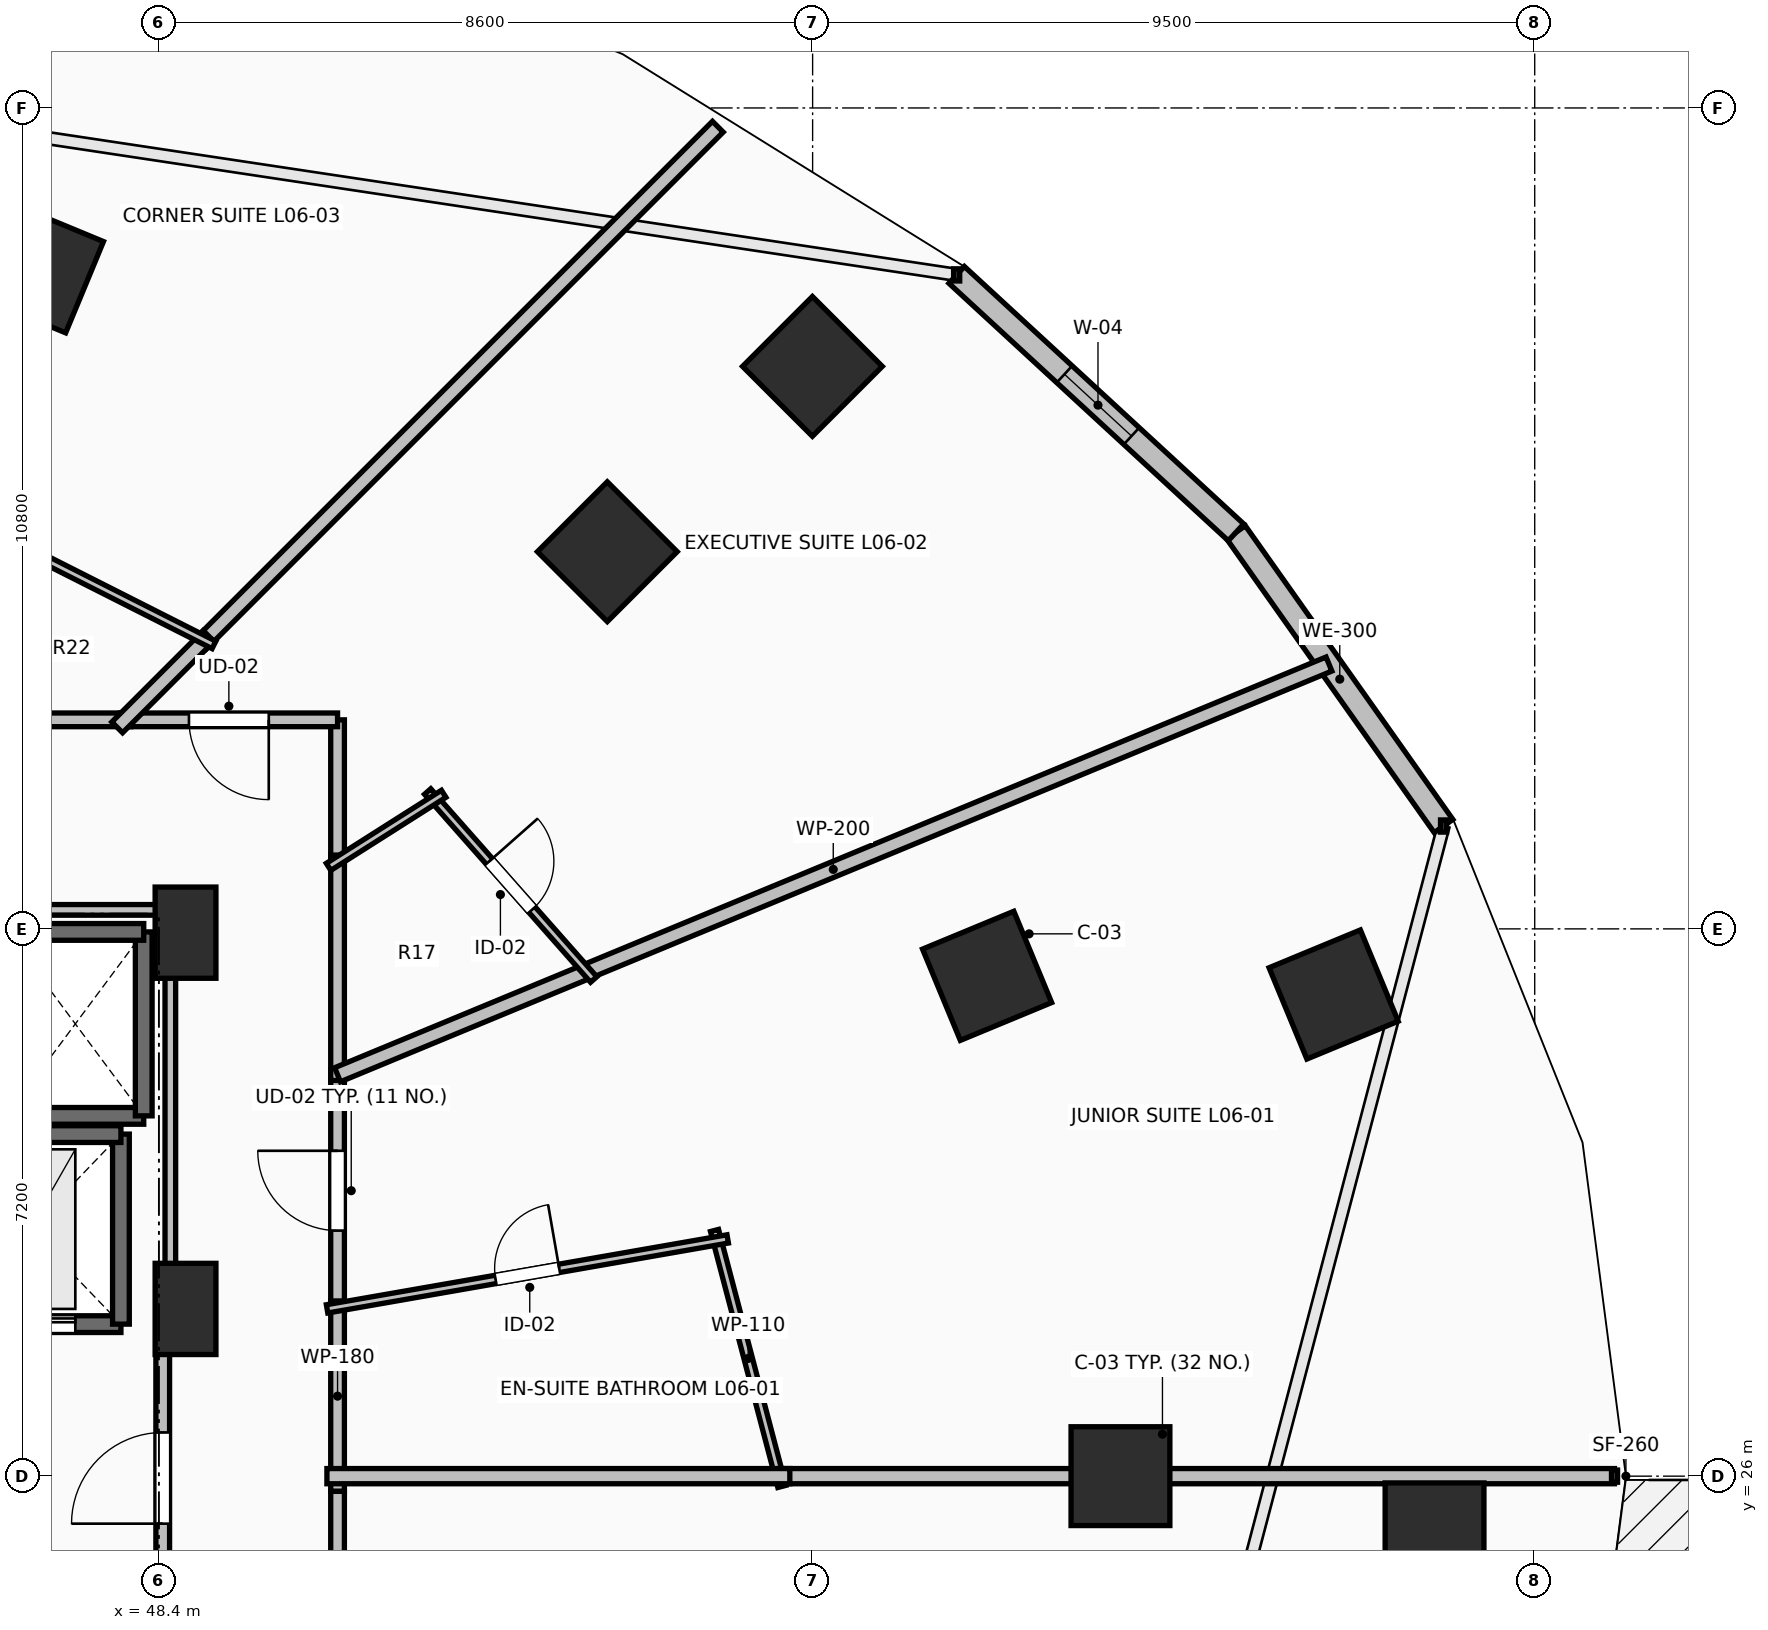
"""IFC4 building model, lengths in metres.
Left out: names, types, materials, properties, quantities, classifications, styles, units other than length and angle.
Written with IfcOpenShell. Run it as: python <this file> out.ifc"""

import sys

from ifc_helpers import new_model, si_unit, direction, frame, frame_2d, origin, origin_2d, place, context, subcontext, project, spatial, rectangle, extrude, element, fill, save


model = new_model("IFC4")
c1 = context("Model", 3, precision=1e-05, world=origin(), true_north=direction((0.0, 1.0)))
c2 = subcontext(c1, "Body", "Model", "MODEL_VIEW")
j1 = project(units=[si_unit("LENGTHUNIT", "METRE"), si_unit("PLANEANGLEUNIT", "RADIAN")], contexts=[c1])
p1 = place(None, origin())
s1 = spatial("IfcSite", under=j1, at=p1, CompositionType="ELEMENT")
p2 = place(p1, origin())
s2 = spatial("IfcBuilding", under=s1, at=p2, CompositionType="ELEMENT")
p3 = place(p2, frame((0.0, 0.0, 27.5)))
s3 = spatial("IfcBuildingStorey", under=s2, at=p3, CompositionType="ELEMENT", Elevation=27.5)
for number, where, z_axis, x_axis in (
    (1, (61.05, 26.0, 0.0), (0.0, 0.0, 1.0), (1.0, 0.0, 0.0)),
    (2, (59.295, 32.582, 0.0), (0.0, 0.0, 1.0), (0.924, 0.383, 0.0)),
    (3, (54.299, 38.162, 0.0), (0.0, 0.0, 1.0), (0.707, 0.707, 0.0)),
    (4, (46.821, 41.891, 0.0), (0.0, 0.0, 1.0), (0.383, 0.924, 0.0)),
    (5, (65.182, 25.261, 0.0), (0.0, 0.0, 1.0), (1.0, 0.0, 0.0)),
    (6, (63.854, 32.337, 0.0), (0.0, 0.0, 1.0), (0.924, 0.383, 0.0)),
    (7, (56.997, 40.6, 0.0), (0.0, 0.0, 1.0), (0.707, 0.707, 0.0)),
):
    element("IfcColumn", number, at=place(p3, frame(where, z_axis=z_axis, x_axis=x_axis)), inside=s3, PredefinedType="COLUMN", context=c2, shape_type="SweptSolid", body=[
        extrude(rectangle(XDim=1.3, YDim=1.3, at=origin_2d()), origin(), (0.0, 0.0, 1.0), 3.5),
    ])
for number, where, z_axis, x_axis in (
    (8, (48.75, 33.15, 0.0), (0.0, 0.0, 1.0), (1.0, 0.0, 0.0)),
    (9, (48.75, 28.2, 0.0), (0.0, 0.0, 1.0), (1.0, 0.0, 0.0)),
):
    element("IfcColumn", number, at=place(p3, frame(where, z_axis=z_axis, x_axis=x_axis)), inside=s3, PredefinedType="PILASTER", context=c2, shape_type="SweptSolid", body=[
        extrude(rectangle(XDim=0.8, YDim=1.2, at=origin_2d()), origin(), (0.0, 0.0, 1.0), 3.5),
    ])
p4 = place(p3, frame((65.301, 34.553, 0.0), z_axis=(0.0, 0.0, 1.0), x_axis=(-0.577130815624, 0.816651713803, 0.0)))
e10 = element("IfcWall", 10, at=p4, inside=s3, PredefinedType="STANDARD", context=c2, shape_type="SweptSolid", body=[
    extrude(rectangle(XDim=4.731, YDim=0.3, at=frame_2d((2.366, 0.0))), origin(), (0.0, 0.0, 1.0), 3.24),
])
p5 = place(p3, frame((62.57, 38.417, 0.0), z_axis=(0.0, 0.0, 1.0), x_axis=(-0.735342629635, 0.677695519419, 0.0)))
e11 = element("IfcWall", 11, at=p5, inside=s3, PredefinedType="STANDARD", context=c2, shape_type="SweptSolid", body=[
    extrude(rectangle(XDim=4.997, YDim=0.3, at=frame_2d((2.499, 0.0))), origin(), (0.0, 0.0, 1.0), 3.24),
])
p6 = place(p5, frame((1.869, 0.0, 0.85)))
e12 = element("IfcOpeningElement", 12, at=p6, cuts=e11, PredefinedType="OPENING", context=c2, shape_type="SweptSolid", body=[
    extrude(rectangle(XDim=1.2, YDim=1.95, at=frame_2d((0.6, 0.975))), frame((0.0, 0.165, 0.0), z_axis=(0.0, -1.0, 0.0), x_axis=(1.0, 0.0, 0.0)), (0.0, 0.0, 1.0), 0.33),
])
p7 = place(p3, frame((46.4, 30.74, 0.0), z_axis=(0.0, 0.0, 1.0), x_axis=(1.0, 0.0, 0.0)))
e13 = element("IfcWall", 13, at=p7, inside=s3, PredefinedType="SOLIDWALL", context=c2, shape_type="SweptSolid", body=[
    extrude(rectangle(XDim=1.8, YDim=0.22, at=frame_2d((0.9, 0.0))), origin(), (0.0, 0.0, 1.0), 3.24),
])
p8 = place(p3, frame((48.2, 30.74, 0.0), z_axis=(0.0, 0.0, 1.0), x_axis=(0.0, 1.0, 0.0)))
e14 = element("IfcWall", 14, at=p8, inside=s3, PredefinedType="SOLIDWALL", context=c2, shape_type="SweptSolid", body=[
    extrude(rectangle(XDim=2.42, YDim=0.22, at=frame_2d((1.21, 0.0))), origin(), (0.0, 0.0, 1.0), 3.24),
])
p9 = place(p3, frame((48.2, 33.16, 0.0), z_axis=(0.0, 0.0, 1.0), x_axis=(-1.0, 0.0, 0.0)))
e15 = element("IfcWall", 15, at=p9, inside=s3, PredefinedType="SOLIDWALL", context=c2, shape_type="SweptSolid", body=[
    extrude(rectangle(XDim=1.8, YDim=0.22, at=frame_2d((0.9, 0.0))), origin(), (0.0, 0.0, 1.0), 3.24),
])
p10 = place(p3, frame((45.5, 28.0, 0.0), z_axis=(0.0, 0.0, 1.0), x_axis=(1.0, 0.0, 0.0)))
e16 = element("IfcWall", 16, at=p10, inside=s3, PredefinedType="SHEAR", context=c2, shape_type="SweptSolid", body=[
    extrude(rectangle(XDim=2.4, YDim=0.22, at=frame_2d((1.2, 0.0))), origin(), (0.0, 0.0, 1.0), 3.24),
])
p11 = place(p10, frame((0.6, 0.0, 0.0)))
e17 = element("IfcOpeningElement", 17, at=p11, cuts=e16, PredefinedType="OPENING", context=c2, shape_type="SweptSolid", body=[
    extrude(rectangle(XDim=1.2, YDim=2.2, at=frame_2d((0.6, 1.1))), frame((0.0, 0.125, 0.0), z_axis=(0.0, -1.0, 0.0), x_axis=(1.0, 0.0, 0.0)), (0.0, 0.0, 1.0), 0.25),
])
p12 = place(p3, frame((47.9, 28.0, 0.0), z_axis=(0.0, 0.0, 1.0), x_axis=(0.0, 1.0, 0.0)))
e18 = element("IfcWall", 18, at=p12, inside=s3, PredefinedType="SHEAR", context=c2, shape_type="SweptSolid", body=[
    extrude(rectangle(XDim=2.5, YDim=0.22, at=frame_2d((1.25, 0.0))), origin(), (0.0, 0.0, 1.0), 3.24),
])
p13 = place(p3, frame((47.9, 30.5, 0.0), z_axis=(0.0, 0.0, 1.0), x_axis=(-1.0, 0.0, 0.0)))
e19 = element("IfcWall", 19, at=p13, inside=s3, PredefinedType="SHEAR", context=c2, shape_type="SweptSolid", body=[
    extrude(rectangle(XDim=2.4, YDim=0.22, at=frame_2d((1.2, 0.0))), origin(), (0.0, 0.0, 1.0), 3.24),
])
p14 = place(p3, frame((48.45, 23.95, 0.0), z_axis=(0.0, 0.0, 1.0), x_axis=(0.0, 1.0, 0.0)))
e20 = element("IfcWall", 20, at=p14, inside=s3, PredefinedType="PARTITIONING", context=c2, shape_type="SweptSolid", body=[
    extrude(rectangle(XDim=4.05, YDim=0.18, at=frame_2d((2.025, 0.0))), origin(), (0.0, 0.0, 1.0), 3.24),
])
p15 = place(p14, frame((1.425, 0.0, 0.0)))
e21 = element("IfcOpeningElement", 21, at=p15, cuts=e20, PredefinedType="OPENING", context=c2, shape_type="SweptSolid", body=[
    extrude(rectangle(XDim=1.2, YDim=2.15, at=frame_2d((0.6, 1.075))), frame((0.0, 0.105, 0.0), z_axis=(0.0, -1.0, 0.0), x_axis=(1.0, 0.0, 0.0)), (0.0, 0.0, 1.0), 0.21),
])
p16 = place(p3, frame((50.75, 28.165, 0.0), z_axis=(0.0, 0.0, 1.0), x_axis=(0.0, 1.0, 0.0)))
e22 = element("IfcWall", 22, at=p16, inside=s3, PredefinedType="PARTITIONING", context=c2, shape_type="SweptSolid", body=[
    extrude(rectangle(XDim=3.181, YDim=0.18, at=frame_2d((1.59, 0.0))), origin(), (0.0, 0.0, 1.0), 3.24),
])
p17 = place(p16, frame((1.065, 0.0, 0.0)))
e23 = element("IfcOpeningElement", 23, at=p17, cuts=e22, PredefinedType="OPENING", context=c2, shape_type="SweptSolid", body=[
    extrude(rectangle(XDim=1.05, YDim=2.2, at=frame_2d((0.525, 1.1))), frame((0.0, 0.105, 0.0), z_axis=(0.0, -1.0, 0.0), x_axis=(1.0, 0.0, 0.0)), (0.0, 0.0, 1.0), 0.21),
])
p18 = place(p3, frame((50.75, 25.8, 0.0), z_axis=(0.0, 0.0, 1.0), x_axis=(0.0, 1.0, 0.0)))
e24 = element("IfcWall", 24, at=p18, inside=s3, PredefinedType="PARTITIONING", context=c2, shape_type="SweptSolid", body=[
    extrude(rectangle(XDim=2.505, YDim=0.18, at=frame_2d((1.252, 0.0))), origin(), (0.0, 0.0, 1.0), 2.432),
])
p19 = place(p3, frame((50.75, 34.031, 0.0), z_axis=(0.0, 0.0, 1.0), x_axis=(0.0, 1.0, 0.0)))
e25 = element("IfcWall", 25, at=p19, inside=s3, PredefinedType="PARTITIONING", context=c2, shape_type="SweptSolid", body=[
    extrude(rectangle(XDim=1.919, YDim=0.18, at=frame_2d((0.959, 0.0))), origin(), (0.0, 0.0, 1.0), 2.432),
])
p20 = place(p3, frame((50.75, 35.95, 0.0), z_axis=(0.0, 0.0, 1.0), x_axis=(-1.0, 0.0, 0.0)))
e26 = element("IfcWall", 26, at=p20, inside=s3, PredefinedType="PARTITIONING", context=c2, shape_type="SweptSolid", body=[
    extrude(rectangle(XDim=2.86, YDim=0.18, at=frame_2d((1.43, 0.0))), origin(), (0.0, 0.0, 1.0), 2.432),
])
p21 = place(p20, frame((0.905, 0.0, 0.0)))
e27 = element("IfcOpeningElement", 27, at=p21, cuts=e26, PredefinedType="OPENING", context=c2, shape_type="SweptSolid", body=[
    extrude(rectangle(XDim=1.05, YDim=2.2, at=frame_2d((0.525, 1.1))), frame((0.0, 0.105, 0.0), z_axis=(0.0, -1.0, 0.0), x_axis=(1.0, 0.0, 0.0)), (0.0, 0.0, 1.0), 0.21),
])
p22 = place(p3, frame((50.75, 31.206, 0.0), z_axis=(0.0, 0.0, 1.0), x_axis=(0.0, 1.0, 0.0)))
e28 = element("IfcWall", 28, at=p22, inside=s3, PredefinedType="PARTITIONING", context=c2, shape_type="SweptSolid", body=[
    extrude(rectangle(XDim=2.965, YDim=0.18, at=frame_2d((1.482, 0.0))), origin(), (0.0, 0.0, 1.0), 2.432),
])
p23 = place(p3, frame((48.03, 35.95, 0.0), z_axis=(0.0, 0.0, 1.0), x_axis=(-1.0, 0.0, 0.0)))
e29 = element("IfcWall", 29, at=p23, inside=s3, PredefinedType="PARTITIONING", context=c2, shape_type="SweptSolid", body=[
    extrude(rectangle(XDim=3.104, YDim=0.18, at=frame_2d((1.552, 0.0))), origin(), (0.0, 0.0, 1.0), 2.432),
])
p24 = place(p3, frame((50.75, 14.1, 0.0), z_axis=(0.0, 0.0, 1.0), x_axis=(0.0, 1.0, 0.0)))
e30 = element("IfcWall", 30, at=p24, inside=s3, PredefinedType="PARTITIONING", context=c2, shape_type="SweptSolid", body=[
    extrude(rectangle(XDim=11.7, YDim=0.18, at=frame_2d((5.85, 0.0))), origin(), (0.0, 0.0, 1.0), 2.432),
])
p25 = place(p24, frame((5.35, 0.0, 0.0)))
e31 = element("IfcOpeningElement", 31, at=p25, cuts=e30, PredefinedType="OPENING", context=c2, shape_type="SweptSolid", body=[
    extrude(rectangle(XDim=1.0, YDim=2.15, at=frame_2d((0.5, 1.075))), frame((0.0, 0.105, 0.0), z_axis=(0.0, -1.0, 0.0), x_axis=(1.0, 0.0, 0.0)), (0.0, 0.0, 1.0), 0.21),
])
p26 = place(p3, frame((55.709, 29.232, 0.0), z_axis=(0.0, 0.0, 1.0), x_axis=(0.254476045764, -0.967079077497, 0.0)))
e32 = element("IfcWall", 32, at=p26, inside=s3, PredefinedType="PARTITIONING", context=c2, shape_type="SweptSolid", body=[
    extrude(rectangle(XDim=3.483, YDim=0.11, at=frame_2d((1.741, 0.0))), origin(), (0.0, 0.0, 1.0), 2.432),
])
p27 = place(p3, frame((50.612, 28.201, 0.0), z_axis=(0.0, 0.0, 1.0), x_axis=(0.985100697644, 0.171978532096, 0.0)))
e33 = element("IfcWall", 33, at=p27, inside=s3, PredefinedType="PARTITIONING", context=c2, shape_type="SweptSolid", body=[
    extrude(rectangle(XDim=5.351, YDim=0.11, at=frame_2d((2.675, 0.0))), origin(), (0.0, 0.0, 1.0), 2.922),
])
p28 = place(p27, frame((2.25, 0.0, 0.0)))
e34 = element("IfcOpeningElement", 34, at=p28, cuts=e33, PredefinedType="OPENING", context=c2, shape_type="SweptSolid", body=[
    extrude(rectangle(XDim=0.85, YDim=2.1, at=frame_2d((0.425, 1.05))), frame((0.0, 0.07, 0.0), z_axis=(0.0, -1.0, 0.0), x_axis=(1.0, 0.0, 0.0)), (0.0, 0.0, 1.0), 0.14),
])
p29 = place(p3, frame((63.793, 36.684, 0.0), z_axis=(0.0, 0.0, 1.0), x_axis=(-0.923866969846, -0.382713759914, 0.0)))
e35 = element("IfcWall", 35, at=p29, inside=s3, PredefinedType="PARTITIONING", context=c2, shape_type="SweptSolid", body=[
    extrude(rectangle(XDim=14.118, YDim=0.2, at=frame_2d((7.059, 0.0))), origin(), (0.0, 0.0, 1.0), 2.432),
])
p30 = place(p3, frame((56.56, 26.0, 0.0), z_axis=(0.0, 0.0, 1.0), x_axis=(1.0, 0.0, 0.0)))
e36 = element("IfcWall", 36, at=p30, inside=s3, PredefinedType="PARTITIONING", context=c2, shape_type="SweptSolid", body=[
    extrude(rectangle(XDim=10.989, YDim=0.2, at=frame_2d((5.495, 0.0))), origin(), (0.0, 0.0, 1.0), 2.432),
])
p31 = place(p3, frame((50.61, 26.0, 0.0), z_axis=(0.0, 0.0, 1.0), x_axis=(1.0, 0.0, 0.0)))
e37 = element("IfcWall", 37, at=p31, inside=s3, PredefinedType="PARTITIONING", context=c2, shape_type="SweptSolid", body=[
    extrude(rectangle(XDim=6.09, YDim=0.2, at=frame_2d((3.045, 0.0))), origin(), (0.0, 0.0, 1.0), 2.432),
])
p32 = place(p3, frame((51.935, 35.007, 0.0), z_axis=(0.0, 0.0, 1.0), x_axis=(0.662059609276, -0.749451181709, 0.0)))
e38 = element("IfcWall", 38, at=p32, inside=s3, PredefinedType="PARTITIONING", context=c2, shape_type="SweptSolid", body=[
    extrude(rectangle(XDim=3.299, YDim=0.11, at=frame_2d((1.65, 0.0))), origin(), (0.0, 0.0, 1.0), 2.432),
])
p33 = place(p32, frame((1.225, 0.0, 0.0)))
e39 = element("IfcOpeningElement", 39, at=p33, cuts=e38, PredefinedType="OPENING", context=c2, shape_type="SweptSolid", body=[
    extrude(rectangle(XDim=0.85, YDim=2.1, at=frame_2d((0.425, 1.05))), frame((0.0, 0.07, 0.0), z_axis=(0.0, -1.0, 0.0), x_axis=(1.0, 0.0, 0.0)), (0.0, 0.0, 1.0), 0.14),
])
p34 = place(p3, frame((50.632, 34.016, 0.0), z_axis=(0.0, 0.0, 1.0), x_axis=(0.844361394482, 0.535774052665, 0.0)))
e40 = element("IfcWall", 40, at=p34, inside=s3, PredefinedType="PARTITIONING", context=c2, shape_type="SweptSolid", body=[
    extrude(rectangle(XDim=1.793, YDim=0.11, at=frame_2d((0.897, 0.0))), origin(), (0.0, 0.0, 1.0), 2.922),
])
p35 = place(p3, frame((55.753, 43.753, 0.0), z_axis=(0.0, 0.0, 1.0), x_axis=(-0.707106781187, -0.707106781187, 0.0)))
e41 = element("IfcWall", 41, at=p35, inside=s3, PredefinedType="PARTITIONING", context=c2, shape_type="SweptSolid", body=[
    extrude(rectangle(XDim=9.615, YDim=0.2, at=frame_2d((4.808, 0.0))), origin(), (0.0, 0.0, 1.0), 2.624),
])
p36 = place(p3, frame((49.053, 37.053, 0.0), z_axis=(0.0, 0.0, 1.0), x_axis=(-0.707106781187, -0.707106781187, 0.0)))
e42 = element("IfcWall", 42, at=p36, inside=s3, PredefinedType="PARTITIONING", context=c2, shape_type="SweptSolid", body=[
    extrude(rectangle(XDim=1.7, YDim=0.2, at=frame_2d((0.85, 0.0))), origin(), (0.0, 0.0, 1.0), 2.432),
])
p37 = place(p3, frame((46.462, 38.281, 0.0), z_axis=(0.0, 0.0, 1.0), x_axis=(0.892486842203, -0.451073426944, 0.0)))
e43 = element("IfcWall", 43, at=p37, inside=s3, PredefinedType="PARTITIONING", context=c2, shape_type="SweptSolid", body=[
    extrude(rectangle(XDim=2.982, YDim=0.11, at=frame_2d((1.491, 0.0))), origin(), (0.0, 0.0, 1.0), 2.432),
])
p38 = place(p3, frame((44.34, 33.45, 0.0), z_axis=(0.0, 0.0, 1.0), x_axis=(1.0, 0.0, 0.0)))
e44 = element("IfcWall", 44, at=p38, inside=s3, PredefinedType="PARTITIONING", context=c2, shape_type="SweptSolid", body=[
    extrude(rectangle(XDim=4.21, YDim=0.14, at=frame_2d((2.105, 0.0))), origin(), (0.0, 0.0, 1.0), 2.432),
])
p39 = place(p3, frame((48.55, 33.45, 0.0), z_axis=(0.0, 0.0, 1.0), x_axis=(0.0, -1.0, 0.0)))
e45 = element("IfcWall", 45, at=p39, inside=s3, PredefinedType="PARTITIONING", context=c2, shape_type="SweptSolid", body=[
    extrude(rectangle(XDim=5.254, YDim=0.14, at=frame_2d((2.627, 0.0))), origin(), (0.0, 0.0, 1.0), 2.432),
])
p40 = place(p6, origin())
e46 = element("IfcWindow", 46, at=p40, inside=s3, PartitioningType="SINGLE_PANEL", PredefinedType="WINDOW", context=c2, shape_type="SweptSolid", body=[
    extrude(rectangle(XDim=1.2, YDim=1.95, at=frame_2d((0.6, 0.975))), frame((0.0, 0.03, 0.0), z_axis=(0.0, -1.0, 0.0), x_axis=(1.0, 0.0, 0.0)), (0.0, 0.0, 1.0), 0.06),
])
fill(e12, e46)
p41 = place(p11, origin())
e47 = element("IfcDoor", 47, at=p41, inside=s3, OperationType="SLIDING_TO_LEFT", PredefinedType="DOOR", context=c2, shape_type="SweptSolid", body=[
    extrude(rectangle(XDim=1.2, YDim=2.2, at=frame_2d((0.6, 1.1))), frame((0.0, 0.025, 0.0), z_axis=(0.0, -1.0, 0.0), x_axis=(1.0, 0.0, 0.0)), (0.0, 0.0, 1.0), 0.05),
])
fill(e17, e47)
p42 = place(p15, origin())
e48 = element("IfcDoor", 48, at=p42, inside=s3, OperationType="SINGLE_SWING_LEFT", PredefinedType="DOOR", context=c2, shape_type="SweptSolid", body=[
    extrude(rectangle(XDim=1.2, YDim=2.15, at=frame_2d((0.6, 1.075))), frame((0.0, 0.025, 0.0), z_axis=(0.0, -1.0, 0.0), x_axis=(1.0, 0.0, 0.0)), (0.0, 0.0, 1.0), 0.05),
])
fill(e21, e48)
p43 = place(p17, origin())
e49 = element("IfcDoor", 49, at=p43, inside=s3, OperationType="SINGLE_SWING_RIGHT", PredefinedType="DOOR", context=c2, shape_type="SweptSolid", body=[
    extrude(rectangle(XDim=1.05, YDim=2.2, at=frame_2d((0.525, 1.1))), frame((0.0, 0.025, 0.0), z_axis=(0.0, -1.0, 0.0), x_axis=(1.0, 0.0, 0.0)), (0.0, 0.0, 1.0), 0.05),
])
fill(e23, e49)
p44 = place(p21, origin())
e50 = element("IfcDoor", 50, at=p44, inside=s3, OperationType="SINGLE_SWING_LEFT", PredefinedType="DOOR", context=c2, shape_type="SweptSolid", body=[
    extrude(rectangle(XDim=1.05, YDim=2.2, at=frame_2d((0.525, 1.1))), frame((0.0, 0.025, 0.0), z_axis=(0.0, -1.0, 0.0), x_axis=(1.0, 0.0, 0.0)), (0.0, 0.0, 1.0), 0.05),
])
fill(e27, e50)
p45 = place(p28, origin())
e51 = element("IfcDoor", 51, at=p45, inside=s3, OperationType="SINGLE_SWING_RIGHT", PredefinedType="DOOR", context=c2, shape_type="SweptSolid", body=[
    extrude(rectangle(XDim=0.85, YDim=2.1, at=frame_2d((0.425, 1.05))), frame((0.0, 0.025, 0.0), z_axis=(0.0, -1.0, 0.0), x_axis=(1.0, 0.0, 0.0)), (0.0, 0.0, 1.0), 0.05),
])
fill(e34, e51)
p46 = place(p33, origin())
e52 = element("IfcDoor", 52, at=p46, inside=s3, OperationType="SINGLE_SWING_LEFT", PredefinedType="DOOR", context=c2, shape_type="SweptSolid", body=[
    extrude(rectangle(XDim=0.85, YDim=2.1, at=frame_2d((0.425, 1.05))), frame((0.0, 0.025, 0.0), z_axis=(0.0, -1.0, 0.0), x_axis=(1.0, 0.0, 0.0)), (0.0, 0.0, 1.0), 0.05),
])
fill(e39, e52)
save(model, sys.argv[1])
